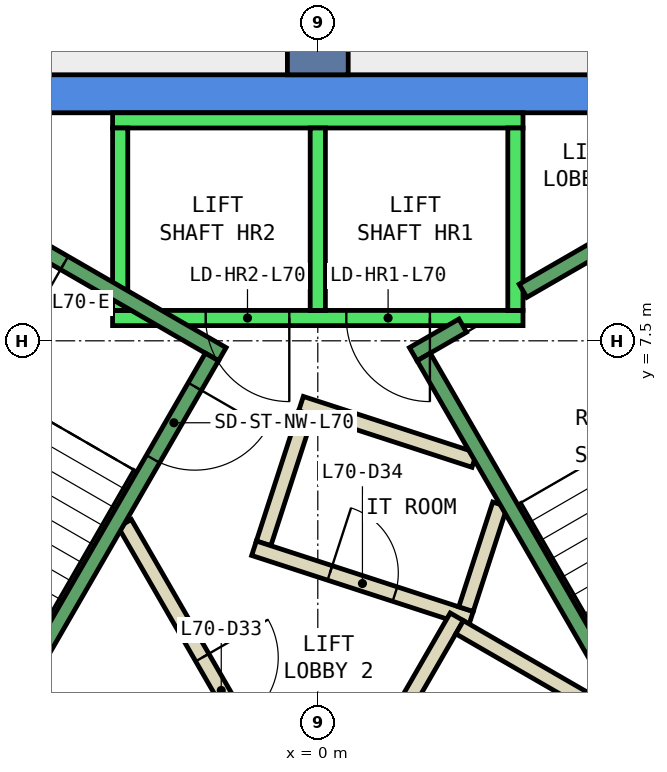
"""IFC4 building model, lengths in metres.
Left out: names, types, materials, properties, quantities, classifications, styles, units other than length and angle.
Written with IfcOpenShell. Run it as: python <this file> out.ifc"""

import sys

from ifc_helpers import new_model, si_unit, direction, frame, frame_2d, origin, place, context, subcontext, project, spatial, polyline, rectangle, outline, extrude, element, fill, save


model = new_model("IFC4")
c1 = context("Model", 3, precision=1e-05, world=origin(), true_north=direction((0.0, 1.0)))
c2 = subcontext(c1, "Body", "Model", "MODEL_VIEW")
j1 = project(units=[si_unit("LENGTHUNIT", "METRE"), si_unit("PLANEANGLEUNIT", "RADIAN")], contexts=[c1])
p1 = place(None, origin())
s1 = spatial("IfcSite", under=j1, at=p1, CompositionType="ELEMENT")
p2 = place(p1, origin())
s2 = spatial("IfcBuilding", under=s1, at=p2, CompositionType="ELEMENT")
p3 = place(p2, frame((0.0, 0.0, 300.8)))
s3 = spatial("IfcBuildingStorey", under=s2, at=p3, CompositionType="ELEMENT", Elevation=300.8)
p4 = place(p3, frame((0.0, 0.0, -0.34)))
e1 = element("IfcWall", 1, at=p4, inside=s3, PredefinedType="SHEAR", context=c2, shape_type="SweptSolid", body=[
    extrude(outline(polyline([(4.907, 11.0), (-4.907, 11.0), (-4.619, 10.5), (4.619, 10.5), (4.907, 11.0)])), origin(), (0.0, 0.0, 1.0), 3.6),
])
p5 = place(p3, frame((0.0, 11.0, -0.34), z_axis=(0.0, 0.0, 1.0), x_axis=(0.0, 1.0, 0.0)))
e2 = element("IfcWall", 2, at=p5, inside=s3, PredefinedType="SHEAR", context=c2, shape_type="SweptSolid", body=[
    extrude(rectangle(XDim=9.0, YDim=0.8, at=frame_2d((4.5, 0.0))), origin(), (0.0, 0.0, 1.0), 3.6),
])
p6 = place(p3, frame((2.06, 5.931, 0.0), z_axis=(0.0, 0.0, 1.0), x_axis=(-0.95092855133, 0.309410552932, 0.0)))
e3 = element("IfcWall", 3, at=p6, inside=s3, PredefinedType="PARTITIONING", context=c2, shape_type="SweptSolid", body=[
    extrude(rectangle(XDim=2.399, YDim=0.2, at=frame_2d((1.199, 0.0))), origin(), (0.0, 0.0, 1.0), 3.26),
])
p7 = place(p3, frame((-0.157, 6.547, 0.0), z_axis=(0.0, 0.0, 1.0), x_axis=(-0.308813127339, -0.951122732555, 0.0)))
e4 = element("IfcWall", 4, at=p7, inside=s3, PredefinedType="PARTITIONING", context=c2, shape_type="SweptSolid", body=[
    extrude(rectangle(XDim=1.8, YDim=0.2, at=frame_2d((0.9, 0.0))), origin(), (0.0, 0.0, 1.0), 3.26),
])
p8 = place(p3, frame((-0.839, 4.771, 0.0), z_axis=(0.0, 0.0, 1.0), x_axis=(0.950961084355, -0.309310549515, 0.0)))
e5 = element("IfcWall", 5, at=p8, inside=s3, PredefinedType="PARTITIONING", context=c2, shape_type="SweptSolid", body=[
    extrude(rectangle(XDim=3.0, YDim=0.2, at=frame_2d((1.5, 0.0))), origin(), (0.0, 0.0, 1.0), 3.26),
])
p9 = place(p8, frame((1.05, 0.0, 0.0)))
e6 = element("IfcOpeningElement", 6, at=p9, cuts=e5, PredefinedType="OPENING", context=c2, shape_type="SweptSolid", body=[
    extrude(rectangle(XDim=0.9, YDim=2.1, at=frame_2d((0.45, 1.05))), frame((0.0, 0.11, 0.0), z_axis=(0.0, -1.0, 0.0), x_axis=(1.0, 0.0, 0.0)), (0.0, 0.0, 1.0), 0.22),
])
p10 = place(p3, frame((1.95, 3.97, 0.0), z_axis=(0.0, 0.0, 1.0), x_axis=(0.308583003896, 0.951197418892, 0.0)))
e7 = element("IfcWall", 7, at=p10, inside=s3, PredefinedType="PARTITIONING", context=c2, shape_type="SweptSolid", body=[
    extrude(rectangle(XDim=1.449, YDim=0.2, at=frame_2d((0.724, 0.0))), origin(), (0.0, 0.0, 1.0), 3.26),
])
p11 = place(p3, frame((-2.969, 15.033, 0.0), z_axis=(0.0, 0.0, 1.0), x_axis=(-0.526330241425, -0.85028023437, 0.0)))
e8 = element("IfcWall", 8, at=p11, inside=s3, PredefinedType="PARTITIONING", context=c2, shape_type="SweptSolid", body=[
    extrude(rectangle(XDim=4.828, YDim=0.2, at=frame_2d((2.414, 0.0))), origin(), (0.0, 0.0, 1.0), 3.26),
])
p12 = place(p11, frame((1.514, 0.0, 0.0)))
e9 = element("IfcOpeningElement", 9, at=p12, cuts=e8, PredefinedType="OPENING", context=c2, shape_type="SweptSolid", body=[
    extrude(rectangle(XDim=1.8, YDim=2.1, at=frame_2d((0.9, 1.05))), frame((0.0, 0.11, 0.0), z_axis=(0.0, -1.0, 0.0), x_axis=(1.0, 0.0, 0.0)), (0.0, 0.0, 1.0), 0.22),
])
p13 = place(p3, frame((0.05, 0.787, 0.0), z_axis=(0.0, 0.0, 1.0), x_axis=(0.499954076797, 0.866051915934, 0.0)))
e10 = element("IfcWall", 10, at=p13, inside=s3, PredefinedType="PARTITIONING", context=c2, shape_type="SweptSolid", body=[
    extrude(rectangle(XDim=3.558, YDim=0.2, at=frame_2d((1.779, 0.0))), origin(), (0.0, 0.0, 1.0), 3.26),
])
p14 = place(p13, frame((1.229, 0.0, 0.0)))
e11 = element("IfcOpeningElement", 11, at=p14, cuts=e10, PredefinedType="OPENING", context=c2, shape_type="SweptSolid", body=[
    extrude(rectangle(XDim=1.0, YDim=2.1, at=frame_2d((0.5, 1.05))), frame((0.0, 0.11, 0.0), z_axis=(0.0, -1.0, 0.0), x_axis=(1.0, 0.0, 0.0)), (0.0, 0.0, 1.0), 0.22),
])
p15 = place(p3, frame((1.866, 3.732, 0.0), z_axis=(0.0, 0.0, 1.0), x_axis=(0.866043361281, -0.499968895414, 0.0)))
e12 = element("IfcWall", 12, at=p15, inside=s3, PredefinedType="PARTITIONING", context=c2, shape_type="SweptSolid", body=[
    extrude(rectangle(XDim=1.858, YDim=0.2, at=frame_2d((0.929, 0.0))), origin(), (0.0, 0.0, 1.0), 3.26),
])
p16 = place(p3, frame((-2.54, 5.1, 0.0), z_axis=(0.0, 0.0, 1.0), x_axis=(0.499925051871, -0.866068670783, 0.0)))
e13 = element("IfcWall", 13, at=p16, inside=s3, PredefinedType="PARTITIONING", context=c2, shape_type="SweptSolid", body=[
    extrude(rectangle(XDim=5.181, YDim=0.2, at=frame_2d((2.59, 0.0))), origin(), (0.0, 0.0, 1.0), 3.26),
])
p17 = place(p16, frame((2.04, 0.0, 0.0)))
e14 = element("IfcOpeningElement", 14, at=p17, cuts=e13, PredefinedType="OPENING", context=c2, shape_type="SweptSolid", body=[
    extrude(rectangle(XDim=1.0, YDim=2.1, at=frame_2d((0.5, 1.05))), frame((0.0, 0.11, 0.0), z_axis=(0.0, -1.0, 0.0), x_axis=(1.0, 0.0, 0.0)), (0.0, 0.0, 1.0), 0.22),
])
p18 = place(p3, frame((4.822, 11.156, 0.0), z_axis=(0.0, 0.0, 1.0), x_axis=(-0.429057973289, 0.903276953961, 0.0)))
e15 = element("IfcWall", 15, at=p18, inside=s3, PredefinedType="PARTITIONING", context=c2, shape_type="SweptSolid", body=[
    extrude(rectangle(XDim=4.298, YDim=0.2, at=frame_2d((2.149, 0.0))), origin(), (0.0, 0.0, 1.0), 3.26),
])
p19 = place(p3, frame((2.7, 7.8, 0.0), z_axis=(0.0, 0.0, 1.0), x_axis=(-1.0, 0.0, 0.0)))
e16 = element("IfcWall", 16, at=p19, inside=s3, PredefinedType="STANDARD", context=c2, shape_type="SweptSolid", body=[
    extrude(rectangle(XDim=5.4, YDim=0.2, at=frame_2d((2.7, 0.0))), origin(), (0.0, 0.0, 1.0), 3.26),
])
p20 = place(p19, frame((1.225, 0.0, 0.0)))
e17 = element("IfcOpeningElement", 17, at=p20, cuts=e16, PredefinedType="OPENING", context=c2, shape_type="SweptSolid", body=[
    extrude(rectangle(XDim=1.1, YDim=2.1, at=frame_2d((0.55, 1.05))), frame((0.0, 0.11, 0.0), z_axis=(0.0, -1.0, 0.0), x_axis=(1.0, 0.0, 0.0)), (0.0, 0.0, 1.0), 0.22),
])
p21 = place(p19, frame((3.075, 0.0, 0.0)))
e18 = element("IfcOpeningElement", 18, at=p21, cuts=e16, PredefinedType="OPENING", context=c2, shape_type="SweptSolid", body=[
    extrude(rectangle(XDim=1.1, YDim=2.1, at=frame_2d((0.55, 1.05))), frame((0.0, 0.11, 0.0), z_axis=(0.0, -1.0, 0.0), x_axis=(1.0, 0.0, 0.0)), (0.0, 0.0, 1.0), 0.22),
])
p22 = place(p3, frame((2.7, 10.4, 0.0), z_axis=(0.0, 0.0, 1.0), x_axis=(-1.0, 0.0, 0.0)))
e19 = element("IfcWall", 19, at=p22, inside=s3, PredefinedType="STANDARD", context=c2, shape_type="SweptSolid", body=[
    extrude(rectangle(XDim=5.4, YDim=0.2, at=frame_2d((2.7, 0.0))), origin(), (0.0, 0.0, 1.0), 3.26),
])
for number, where, z_axis, x_axis in (
    (20, (2.6, 7.9, 0.0), (0.0, 0.0, 1.0), (0.0, 1.0, 0.0)),
    (21, (0.0, 7.9, 0.0), (0.0, 0.0, 1.0), (0.0, 1.0, 0.0)),
    (22, (-2.6, 7.9, 0.0), (0.0, 0.0, 1.0), (0.0, 1.0, 0.0)),
):
    element("IfcWall", number, at=place(p3, frame(where, z_axis=z_axis, x_axis=x_axis)), inside=s3, PredefinedType="STANDARD", context=c2, shape_type="SweptSolid", body=[
        extrude(rectangle(XDim=2.4, YDim=0.2, at=frame_2d((1.2, 0.0))), origin(), (0.0, 0.0, 1.0), 3.26),
    ])
p23 = place(p3, frame((2.7, 8.158, 0.0), z_axis=(0.0, 0.0, 1.0), x_axis=(0.86611865017, 0.499838457731, 0.0)))
e23 = element("IfcWall", 23, at=p23, inside=s3, PredefinedType="STANDARD", context=c2, shape_type="SweptSolid", body=[
    extrude(rectangle(XDim=2.733, YDim=0.2, at=frame_2d((1.366, 0.0))), origin(), (0.0, 0.0, 1.0), 3.26),
])
p24 = place(p3, frame((1.256, 7.324, 0.0), z_axis=(0.0, 0.0, 1.0), x_axis=(0.865915093549, 0.500191014278, 0.0)))
e24 = element("IfcWall", 24, at=p24, inside=s3, PredefinedType="STANDARD", context=c2, shape_type="SweptSolid", body=[
    extrude(rectangle(XDim=0.752, YDim=0.2, at=frame_2d((0.376, 0.0))), origin(), (0.0, 0.0, 1.0), 3.26),
])
p25 = place(p3, frame((4.843, 1.312, 0.0), z_axis=(0.0, 0.0, 1.0), x_axis=(-0.499963383562, 0.866046543262, 0.0)))
e25 = element("IfcWall", 25, at=p25, inside=s3, PredefinedType="STANDARD", context=c2, shape_type="SweptSolid", body=[
    extrude(rectangle(XDim=6.9, YDim=0.2, at=frame_2d((3.45, 0.0))), origin(), (0.0, 0.0, 1.0), 3.26),
])
p26 = place(p25, frame((0.45, 0.0, 0.0)))
e26 = element("IfcOpeningElement", 26, at=p26, cuts=e25, PredefinedType="OPENING", context=c2, shape_type="SweptSolid", body=[
    extrude(rectangle(XDim=1.1, YDim=2.2, at=frame_2d((0.55, 1.1))), frame((0.0, 0.11, 0.0), z_axis=(0.0, -1.0, 0.0), x_axis=(1.0, 0.0, 0.0)), (0.0, 0.0, 1.0), 0.22),
])
p27 = place(p3, frame((-1.256, 7.324, 0.0), z_axis=(0.0, 0.0, 1.0), x_axis=(-0.866046073146, 0.499964197906, 0.0)))
e27 = element("IfcWall", 27, at=p27, inside=s3, PredefinedType="STANDARD", context=c2, shape_type="SweptSolid", body=[
    extrude(rectangle(XDim=4.4, YDim=0.2, at=frame_2d((2.2, 0.0))), origin(), (0.0, 0.0, 1.0), 3.26),
])
p28 = place(p27, frame((2.4, 0.0, 0.0)))
e28 = element("IfcOpeningElement", 28, at=p28, cuts=e27, PredefinedType="OPENING", context=c2, shape_type="SweptSolid", body=[
    extrude(rectangle(XDim=1.1, YDim=2.2, at=frame_2d((0.55, 1.1))), frame((0.0, 0.11, 0.0), z_axis=(0.0, -1.0, 0.0), x_axis=(1.0, 0.0, 0.0)), (0.0, 0.0, 1.0), 0.22),
])
p29 = place(p3, frame((-1.393, 7.288, 0.0), z_axis=(0.0, 0.0, 1.0), x_axis=(-0.499963383562, -0.866046543262, 0.0)))
e29 = element("IfcWall", 29, at=p29, inside=s3, PredefinedType="STANDARD", context=c2, shape_type="SweptSolid", body=[
    extrude(rectangle(XDim=6.9, YDim=0.2, at=frame_2d((3.45, 0.0))), origin(), (0.0, 0.0, 1.0), 3.26),
])
p30 = place(p29, frame((0.45, 0.0, 0.0)))
e30 = element("IfcOpeningElement", 30, at=p30, cuts=e29, PredefinedType="OPENING", context=c2, shape_type="SweptSolid", body=[
    extrude(rectangle(XDim=1.1, YDim=2.2, at=frame_2d((0.55, 1.1))), frame((0.0, 0.11, 0.0), z_axis=(0.0, -1.0, 0.0), x_axis=(1.0, 0.0, 0.0)), (0.0, 0.0, 1.0), 0.22),
])
p31 = place(p17, origin())
e31 = element("IfcDoor", 31, at=p31, inside=s3, OperationType="SINGLE_SWING_RIGHT", PredefinedType="DOOR", context=c2, shape_type="SweptSolid", body=[
    extrude(rectangle(XDim=1.0, YDim=2.1, at=frame_2d((0.5, 1.05))), frame((0.0, 0.025, 0.0), z_axis=(0.0, -1.0, 0.0), x_axis=(1.0, 0.0, 0.0)), (0.0, 0.0, 1.0), 0.05),
])
fill(e14, e31)
p32 = place(p9, origin())
e32 = element("IfcDoor", 32, at=p32, inside=s3, OperationType="SINGLE_SWING_LEFT", PredefinedType="DOOR", context=c2, shape_type="SweptSolid", body=[
    extrude(rectangle(XDim=0.9, YDim=2.1, at=frame_2d((0.45, 1.05))), frame((0.0, 0.025, 0.0), z_axis=(0.0, -1.0, 0.0), x_axis=(1.0, 0.0, 0.0)), (0.0, 0.0, 1.0), 0.05),
])
fill(e6, e32)
p33 = place(p20, origin())
e33 = element("IfcDoor", 33, at=p33, inside=s3, OperationType="SLIDING_TO_LEFT", PredefinedType="DOOR", context=c2, shape_type="SweptSolid", body=[
    extrude(rectangle(XDim=1.1, YDim=2.1, at=frame_2d((0.55, 1.05))), frame((0.0, 0.025, 0.0), z_axis=(0.0, -1.0, 0.0), x_axis=(1.0, 0.0, 0.0)), (0.0, 0.0, 1.0), 0.05),
])
fill(e17, e33)
p34 = place(p21, origin())
e34 = element("IfcDoor", 34, at=p34, inside=s3, OperationType="SLIDING_TO_LEFT", PredefinedType="DOOR", context=c2, shape_type="SweptSolid", body=[
    extrude(rectangle(XDim=1.1, YDim=2.1, at=frame_2d((0.55, 1.05))), frame((0.0, 0.025, 0.0), z_axis=(0.0, -1.0, 0.0), x_axis=(1.0, 0.0, 0.0)), (0.0, 0.0, 1.0), 0.05),
])
fill(e18, e34)
p35 = place(p30, origin())
e35 = element("IfcDoor", 35, at=p35, inside=s3, OperationType="SINGLE_SWING_LEFT", PredefinedType="DOOR", context=c2, shape_type="SweptSolid", body=[
    extrude(rectangle(XDim=1.1, YDim=2.2, at=frame_2d((0.55, 1.1))), frame((0.0, 0.025, 0.0), z_axis=(0.0, -1.0, 0.0), x_axis=(1.0, 0.0, 0.0)), (0.0, 0.0, 1.0), 0.05),
])
fill(e30, e35)
p36 = place(p28, origin())
e36 = element("IfcDoor", 36, at=p36, inside=s3, OperationType="SINGLE_SWING_LEFT", PredefinedType="DOOR", context=c2, shape_type="SweptSolid", body=[
    extrude(rectangle(XDim=1.1, YDim=2.2, at=frame_2d((0.55, 1.1))), frame((0.0, 0.025, 0.0), z_axis=(0.0, -1.0, 0.0), x_axis=(1.0, 0.0, 0.0)), (0.0, 0.0, 1.0), 0.05),
])
fill(e28, e36)
save(model, sys.argv[1])
